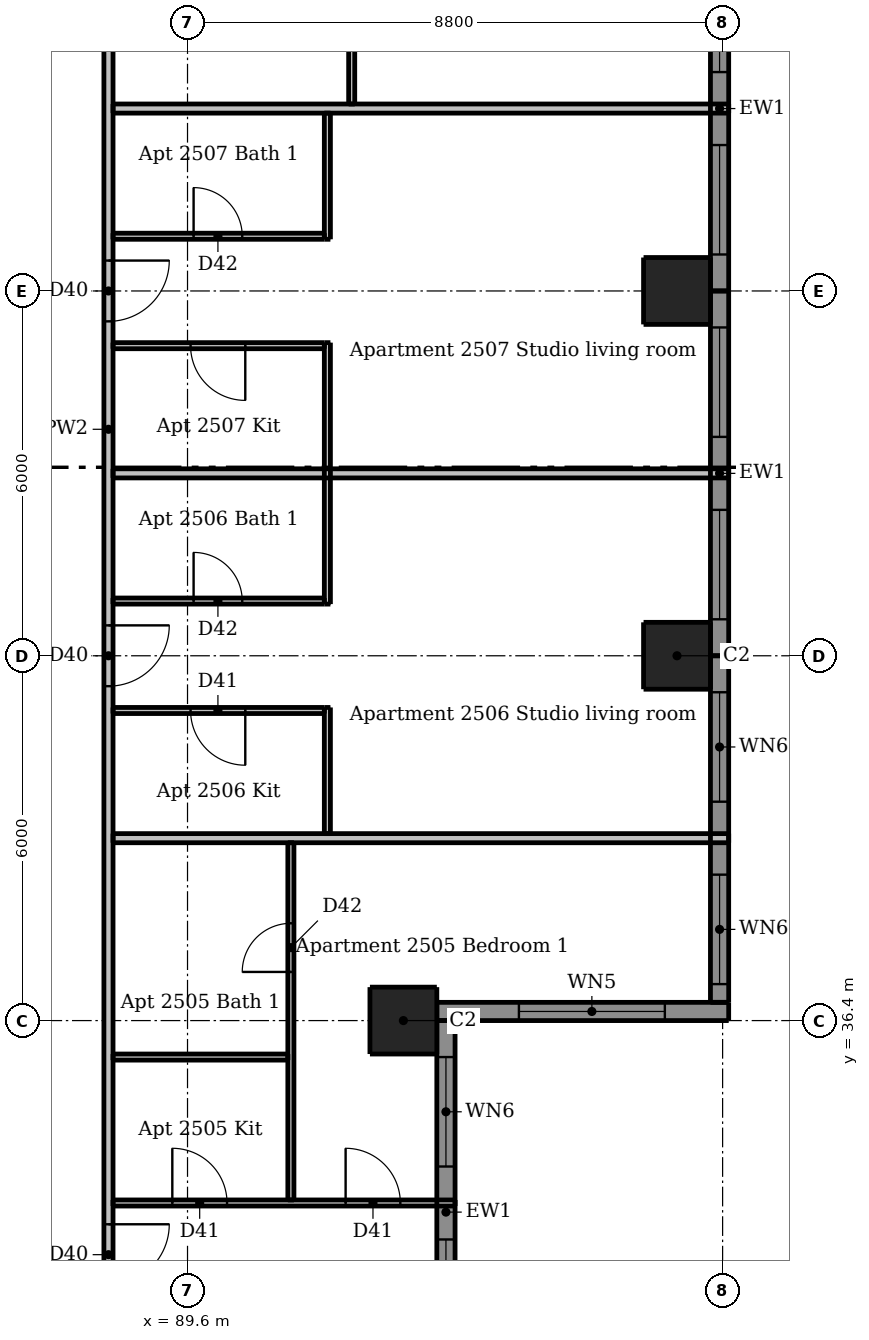
"""IFC4 building model, lengths in metres.
Left out: names, types, materials, properties, quantities, classifications, styles, units other than length and angle.
Written with IfcOpenShell. Run it as: python <this file> out.ifc"""

import sys

from ifc_helpers import new_model, si_unit, direction, frame, frame_2d, origin, origin_2d, place, context, subcontext, project, spatial, rectangle, extrude, element, fill, save


model = new_model("IFC4")
c1 = context("Model", 3, precision=1e-05, world=origin(), true_north=direction((0.0, 1.0)))
c2 = subcontext(c1, "Body", "Model", "MODEL_VIEW")
j1 = project(units=[si_unit("LENGTHUNIT", "METRE"), si_unit("PLANEANGLEUNIT", "RADIAN")], contexts=[c1])
p1 = place(None, origin())
s1 = spatial("IfcSite", under=j1, at=p1, CompositionType="ELEMENT")
p2 = place(p1, origin())
s2 = spatial("IfcBuilding", under=s1, at=p2, CompositionType="ELEMENT")
p3 = place(p2, frame((0.0, 0.0, 95.2)))
s3 = spatial("IfcBuildingStorey", under=s2, at=p3, CompositionType="ELEMENT", Elevation=95.2)
for number, where, z_axis, x_axis in (
    (1, (93.15, 36.4, 0.0), (0.0, 0.0, 1.0), (1.0, 0.0, 0.0)),
    (2, (97.65, 42.4, 0.0), (0.0, 0.0, 1.0), (1.0, 0.0, 0.0)),
    (3, (97.65, 48.4, 0.0), (0.0, 0.0, 1.0), (1.0, 0.0, 0.0)),
):
    element("IfcColumn", number, at=place(p3, frame(where, z_axis=z_axis, x_axis=x_axis)), inside=s3, PredefinedType="COLUMN", context=c2, shape_type="SweptSolid", body=[
        extrude(rectangle(XDim=1.1, YDim=1.1, at=origin_2d()), origin(), (0.0, 0.0, 1.0), 3.05),
    ])
p4 = place(p3, frame((93.7, 36.55, 0.0), z_axis=(0.0, 0.0, 1.0), x_axis=(1.0, 0.0, 0.0)))
e4 = element("IfcWall", 4, at=p4, inside=s3, PredefinedType="SOLIDWALL", context=c2, shape_type="SweptSolid", body=[
    extrude(rectangle(XDim=4.8, YDim=0.3, at=frame_2d((2.4, 0.0))), origin(), (0.0, 0.0, 1.0), 3.05),
])
p5 = place(p4, frame((1.35, 0.0, 0.15)))
e5 = element("IfcOpeningElement", 5, at=p5, cuts=e4, PredefinedType="OPENING", context=c2, shape_type="SweptSolid", body=[
    extrude(rectangle(XDim=2.4, YDim=2.1, at=frame_2d((1.2, 1.05))), frame((0.0, 0.16, 0.0), z_axis=(0.0, -1.0, 0.0), x_axis=(1.0, 0.0, 0.0)), (0.0, 0.0, 1.0), 0.32),
])
p6 = place(p3, frame((93.85, 30.1, 0.0), z_axis=(0.0, 0.0, 1.0), x_axis=(0.0, 1.0, 0.0)))
e6 = element("IfcWall", 6, at=p6, inside=s3, PredefinedType="SOLIDWALL", context=c2, shape_type="SweptSolid", body=[
    extrude(rectangle(XDim=6.3, YDim=0.3, at=frame_2d((3.15, 0.0))), origin(), (0.0, 0.0, 1.0), 3.05),
])
p7 = place(p6, frame((0.9, 0.0, 0.15)))
e7 = element("IfcOpeningElement", 7, at=p7, cuts=e6, PredefinedType="OPENING", context=c2, shape_type="SweptSolid", body=[
    extrude(rectangle(XDim=1.8, YDim=2.1, at=frame_2d((0.9, 1.05))), frame((0.0, 0.16, 0.0), z_axis=(0.0, -1.0, 0.0), x_axis=(1.0, 0.0, 0.0)), (0.0, 0.0, 1.0), 0.32),
])
p8 = place(p6, frame((3.9, 0.0, 0.15)))
e8 = element("IfcOpeningElement", 8, at=p8, cuts=e6, PredefinedType="OPENING", context=c2, shape_type="SweptSolid", body=[
    extrude(rectangle(XDim=1.8, YDim=2.1, at=frame_2d((0.9, 1.05))), frame((0.0, 0.16, 0.0), z_axis=(0.0, -1.0, 0.0), x_axis=(1.0, 0.0, 0.0)), (0.0, 0.0, 1.0), 0.32),
])
p9 = place(p3, frame((98.35, 36.7, 0.0), z_axis=(0.0, 0.0, 1.0), x_axis=(0.0, 1.0, 0.0)))
e9 = element("IfcWall", 9, at=p9, inside=s3, PredefinedType="SOLIDWALL", context=c2, shape_type="SweptSolid", body=[
    extrude(rectangle(XDim=5.7, YDim=0.3, at=frame_2d((2.85, 0.0))), origin(), (0.0, 0.0, 1.0), 3.05),
])
p10 = place(p9, frame((0.3, 0.0, 0.15)))
e10 = element("IfcOpeningElement", 10, at=p10, cuts=e9, PredefinedType="OPENING", context=c2, shape_type="SweptSolid", body=[
    extrude(rectangle(XDim=1.8, YDim=2.1, at=frame_2d((0.9, 1.05))), frame((0.0, 0.16, 0.0), z_axis=(0.0, -1.0, 0.0), x_axis=(1.0, 0.0, 0.0)), (0.0, 0.0, 1.0), 0.32),
])
p11 = place(p9, frame((3.3, 0.0, 0.15)))
e11 = element("IfcOpeningElement", 11, at=p11, cuts=e9, PredefinedType="OPENING", context=c2, shape_type="SweptSolid", body=[
    extrude(rectangle(XDim=1.8, YDim=2.1, at=frame_2d((0.9, 1.05))), frame((0.0, 0.16, 0.0), z_axis=(0.0, -1.0, 0.0), x_axis=(1.0, 0.0, 0.0)), (0.0, 0.0, 1.0), 0.32),
])
p12 = place(p3, frame((98.35, 42.4, 0.0), z_axis=(0.0, 0.0, 1.0), x_axis=(0.0, 1.0, 0.0)))
e12 = element("IfcWall", 12, at=p12, inside=s3, PredefinedType="SOLIDWALL", context=c2, shape_type="SweptSolid", body=[
    extrude(rectangle(XDim=6.0, YDim=0.3, at=frame_2d((3.0, 0.0))), origin(), (0.0, 0.0, 1.0), 3.05),
])
p13 = place(p12, frame((0.6, 0.0, 0.15)))
e13 = element("IfcOpeningElement", 13, at=p13, cuts=e12, PredefinedType="OPENING", context=c2, shape_type="SweptSolid", body=[
    extrude(rectangle(XDim=1.8, YDim=2.1, at=frame_2d((0.9, 1.05))), frame((0.0, 0.16, 0.0), z_axis=(0.0, -1.0, 0.0), x_axis=(1.0, 0.0, 0.0)), (0.0, 0.0, 1.0), 0.32),
])
p14 = place(p12, frame((3.6, 0.0, 0.15)))
e14 = element("IfcOpeningElement", 14, at=p14, cuts=e12, PredefinedType="OPENING", context=c2, shape_type="SweptSolid", body=[
    extrude(rectangle(XDim=1.8, YDim=2.1, at=frame_2d((0.9, 1.05))), frame((0.0, 0.16, 0.0), z_axis=(0.0, -1.0, 0.0), x_axis=(1.0, 0.0, 0.0)), (0.0, 0.0, 1.0), 0.32),
])
p15 = place(p3, frame((98.35, 48.4, 0.0), z_axis=(0.0, 0.0, 1.0), x_axis=(0.0, 1.0, 0.0)))
e15 = element("IfcWall", 15, at=p15, inside=s3, PredefinedType="SOLIDWALL", context=c2, shape_type="SweptSolid", body=[
    extrude(rectangle(XDim=6.0, YDim=0.3, at=frame_2d((3.0, 0.0))), origin(), (0.0, 0.0, 1.0), 3.05),
])
p16 = place(p15, frame((0.6, 0.0, 0.15)))
e16 = element("IfcOpeningElement", 16, at=p16, cuts=e15, PredefinedType="OPENING", context=c2, shape_type="SweptSolid", body=[
    extrude(rectangle(XDim=1.8, YDim=2.1, at=frame_2d((0.9, 1.05))), frame((0.0, 0.16, 0.0), z_axis=(0.0, -1.0, 0.0), x_axis=(1.0, 0.0, 0.0)), (0.0, 0.0, 1.0), 0.32),
])
p17 = place(p15, frame((3.6, 0.0, 0.15)))
e17 = element("IfcOpeningElement", 17, at=p17, cuts=e15, PredefinedType="OPENING", context=c2, shape_type="SweptSolid", body=[
    extrude(rectangle(XDim=1.8, YDim=2.1, at=frame_2d((0.9, 1.05))), frame((0.0, 0.16, 0.0), z_axis=(0.0, -1.0, 0.0), x_axis=(1.0, 0.0, 0.0)), (0.0, 0.0, 1.0), 0.32),
])
p18 = place(p3, frame((91.3, 33.45, 0.0), z_axis=(0.0, 0.0, 1.0), x_axis=(0.0, 1.0, 0.0)))
e18 = element("IfcWall", 18, at=p18, inside=s3, PredefinedType="PARTITIONING", context=c2, shape_type="SweptSolid", body=[
    extrude(rectangle(XDim=5.875, YDim=0.1, at=frame_2d((2.938, 0.0))), origin(), (0.0, 0.0, 1.0), 3.05),
])
p19 = place(p18, frame((3.75, 0.0, 0.0)))
e19 = element("IfcOpeningElement", 19, at=p19, cuts=e18, PredefinedType="OPENING", context=c2, shape_type="SweptSolid", body=[
    extrude(rectangle(XDim=0.8, YDim=2.1, at=frame_2d((0.4, 1.05))), frame((0.0, 0.06, 0.0), z_axis=(0.0, -1.0, 0.0), x_axis=(1.0, 0.0, 0.0)), (0.0, 0.0, 1.0), 0.12),
])
p20 = place(p3, frame((91.9, 39.475, 0.0), z_axis=(0.0, 0.0, 1.0), x_axis=(0.0, 1.0, 0.0)))
e20 = element("IfcWall", 20, at=p20, inside=s3, PredefinedType="PARTITIONING", context=c2, shape_type="SweptSolid", body=[
    extrude(rectangle(XDim=2.075, YDim=0.1, at=frame_2d((1.038, 0.0))), origin(), (0.0, 0.0, 1.0), 3.05),
])
p21 = place(p3, frame((91.9, 43.25, 0.0), z_axis=(0.0, 0.0, 1.0), x_axis=(0.0, 1.0, 0.0)))
e21 = element("IfcWall", 21, at=p21, inside=s3, PredefinedType="PARTITIONING", context=c2, shape_type="SweptSolid", body=[
    extrude(rectangle(XDim=4.3, YDim=0.1, at=frame_2d((2.15, 0.0))), origin(), (0.0, 0.0, 1.0), 3.05),
])
p22 = place(p3, frame((91.9, 49.25, 0.0), z_axis=(0.0, 0.0, 1.0), x_axis=(0.0, 1.0, 0.0)))
e22 = element("IfcWall", 22, at=p22, inside=s3, PredefinedType="PARTITIONING", context=c2, shape_type="SweptSolid", body=[
    extrude(rectangle(XDim=2.075, YDim=0.1, at=frame_2d((1.038, 0.0))), origin(), (0.0, 0.0, 1.0), 3.05),
])
p23 = place(p3, frame((92.3, 51.475, 0.0), z_axis=(0.0, 0.0, 1.0), x_axis=(0.0, 1.0, 0.0)))
e23 = element("IfcWall", 23, at=p23, inside=s3, PredefinedType="PARTITIONING", context=c2, shape_type="SweptSolid", body=[
    extrude(rectangle(XDim=2.875, YDim=0.1, at=frame_2d((1.438, 0.0))), origin(), (0.0, 0.0, 1.0), 3.05),
])
p24 = place(p3, frame((88.375, 49.3, 0.0), z_axis=(0.0, 0.0, 1.0), x_axis=(1.0, 0.0, 0.0)))
e24 = element("IfcWall", 24, at=p24, inside=s3, PredefinedType="PARTITIONING", context=c2, shape_type="SweptSolid", body=[
    extrude(rectangle(XDim=3.475, YDim=0.1, at=frame_2d((1.738, 0.0))), origin(), (0.0, 0.0, 1.0), 3.05),
])
p25 = place(p24, frame((1.325, 0.0, 0.0)))
e25 = element("IfcOpeningElement", 25, at=p25, cuts=e24, PredefinedType="OPENING", context=c2, shape_type="SweptSolid", body=[
    extrude(rectangle(XDim=0.8, YDim=2.1, at=frame_2d((0.4, 1.05))), frame((0.0, 0.06, 0.0), z_axis=(0.0, -1.0, 0.0), x_axis=(1.0, 0.0, 0.0)), (0.0, 0.0, 1.0), 0.12),
])
p26 = place(p3, frame((91.85, 47.5, 0.0), z_axis=(0.0, 0.0, 1.0), x_axis=(-1.0, 0.0, 0.0)))
e26 = element("IfcWall", 26, at=p26, inside=s3, PredefinedType="PARTITIONING", context=c2, shape_type="SweptSolid", body=[
    extrude(rectangle(XDim=3.475, YDim=0.1, at=frame_2d((1.738, 0.0))), origin(), (0.0, 0.0, 1.0), 3.05),
])
p27 = place(p26, frame((1.3, 0.0, 0.0)))
e27 = element("IfcOpeningElement", 27, at=p27, cuts=e26, PredefinedType="OPENING", context=c2, shape_type="SweptSolid", body=[
    extrude(rectangle(XDim=0.9, YDim=2.1, at=frame_2d((0.45, 1.05))), frame((0.0, 0.06, 0.0), z_axis=(0.0, -1.0, 0.0), x_axis=(1.0, 0.0, 0.0)), (0.0, 0.0, 1.0), 0.12),
])
p28 = place(p3, frame((88.375, 43.3, 0.0), z_axis=(0.0, 0.0, 1.0), x_axis=(1.0, 0.0, 0.0)))
e28 = element("IfcWall", 28, at=p28, inside=s3, PredefinedType="PARTITIONING", context=c2, shape_type="SweptSolid", body=[
    extrude(rectangle(XDim=3.475, YDim=0.1, at=frame_2d((1.738, 0.0))), origin(), (0.0, 0.0, 1.0), 3.05),
])
p29 = place(p28, frame((1.325, 0.0, 0.0)))
e29 = element("IfcOpeningElement", 29, at=p29, cuts=e28, PredefinedType="OPENING", context=c2, shape_type="SweptSolid", body=[
    extrude(rectangle(XDim=0.8, YDim=2.1, at=frame_2d((0.4, 1.05))), frame((0.0, 0.06, 0.0), z_axis=(0.0, -1.0, 0.0), x_axis=(1.0, 0.0, 0.0)), (0.0, 0.0, 1.0), 0.12),
])
p30 = place(p3, frame((91.85, 41.5, 0.0), z_axis=(0.0, 0.0, 1.0), x_axis=(-1.0, 0.0, 0.0)))
e30 = element("IfcWall", 30, at=p30, inside=s3, PredefinedType="PARTITIONING", context=c2, shape_type="SweptSolid", body=[
    extrude(rectangle(XDim=3.475, YDim=0.1, at=frame_2d((1.738, 0.0))), origin(), (0.0, 0.0, 1.0), 3.05),
])
p31 = place(p30, frame((1.3, 0.0, 0.0)))
e31 = element("IfcOpeningElement", 31, at=p31, cuts=e30, PredefinedType="OPENING", context=c2, shape_type="SweptSolid", body=[
    extrude(rectangle(XDim=0.9, YDim=2.1, at=frame_2d((0.45, 1.05))), frame((0.0, 0.06, 0.0), z_axis=(0.0, -1.0, 0.0), x_axis=(1.0, 0.0, 0.0)), (0.0, 0.0, 1.0), 0.12),
])
p32 = place(p3, frame((88.375, 35.8, 0.0), z_axis=(0.0, 0.0, 1.0), x_axis=(1.0, 0.0, 0.0)))
e32 = element("IfcWall", 32, at=p32, inside=s3, PredefinedType="PARTITIONING", context=c2, shape_type="SweptSolid", body=[
    extrude(rectangle(XDim=2.875, YDim=0.1, at=frame_2d((1.438, 0.0))), origin(), (0.0, 0.0, 1.0), 3.05),
])
p33 = place(p3, frame((88.375, 33.4, 0.0), z_axis=(0.0, 0.0, 1.0), x_axis=(1.0, 0.0, 0.0)))
e33 = element("IfcWall", 33, at=p33, inside=s3, PredefinedType="PARTITIONING", context=c2, shape_type="SweptSolid", body=[
    extrude(rectangle(XDim=5.625, YDim=0.1, at=frame_2d((2.812, 0.0))), origin(), (0.0, 0.0, 1.0), 3.05),
])
p34 = place(p33, frame((0.975, 0.0, 0.0)))
e34 = element("IfcOpeningElement", 34, at=p34, cuts=e33, PredefinedType="OPENING", context=c2, shape_type="SweptSolid", body=[
    extrude(rectangle(XDim=0.9, YDim=2.1, at=frame_2d((0.45, 1.05))), frame((0.0, 0.06, 0.0), z_axis=(0.0, -1.0, 0.0), x_axis=(1.0, 0.0, 0.0)), (0.0, 0.0, 1.0), 0.12),
])
p35 = place(p33, frame((3.825, 0.0, 0.0)))
e35 = element("IfcOpeningElement", 35, at=p35, cuts=e33, PredefinedType="OPENING", context=c2, shape_type="SweptSolid", body=[
    extrude(rectangle(XDim=0.9, YDim=2.1, at=frame_2d((0.45, 1.05))), frame((0.0, 0.06, 0.0), z_axis=(0.0, -1.0, 0.0), x_axis=(1.0, 0.0, 0.0)), (0.0, 0.0, 1.0), 0.12),
])
p36 = place(p3, frame((88.3, 60.475, 0.0), z_axis=(0.0, 0.0, 1.0), x_axis=(0.0, -1.0, 0.0)))
e36 = element("IfcWall", 36, at=p36, inside=s3, PredefinedType="PARTITIONING", context=c2, shape_type="SweptSolid", body=[
    extrude(rectangle(XDim=28.7, YDim=0.15, at=frame_2d((14.35, 0.0))), origin(), (0.0, 0.0, 1.0), 3.05),
])
p37 = place(p36, frame((27.425, 0.0, 0.0)))
e37 = element("IfcOpeningElement", 37, at=p37, cuts=e36, PredefinedType="OPENING", context=c2, shape_type="SweptSolid", body=[
    extrude(rectangle(XDim=1.0, YDim=2.1, at=frame_2d((0.5, 1.05))), frame((0.0, 0.085, 0.0), z_axis=(0.0, -1.0, 0.0), x_axis=(1.0, 0.0, 0.0)), (0.0, 0.0, 1.0), 0.17),
])
p38 = place(p36, frame((17.575, 0.0, 0.0)))
e38 = element("IfcOpeningElement", 38, at=p38, cuts=e36, PredefinedType="OPENING", context=c2, shape_type="SweptSolid", body=[
    extrude(rectangle(XDim=1.0, YDim=2.1, at=frame_2d((0.5, 1.05))), frame((0.0, 0.085, 0.0), z_axis=(0.0, -1.0, 0.0), x_axis=(1.0, 0.0, 0.0)), (0.0, 0.0, 1.0), 0.17),
])
p39 = place(p36, frame((11.575, 0.0, 0.0)))
e39 = element("IfcOpeningElement", 39, at=p39, cuts=e36, PredefinedType="OPENING", context=c2, shape_type="SweptSolid", body=[
    extrude(rectangle(XDim=1.0, YDim=2.1, at=frame_2d((0.5, 1.05))), frame((0.0, 0.085, 0.0), z_axis=(0.0, -1.0, 0.0), x_axis=(1.0, 0.0, 0.0)), (0.0, 0.0, 1.0), 0.17),
])
p40 = place(p36, frame((3.775, 0.0, 0.0)))
e40 = element("IfcOpeningElement", 40, at=p40, cuts=e36, PredefinedType="OPENING", context=c2, shape_type="SweptSolid", body=[
    extrude(rectangle(XDim=1.0, YDim=2.1, at=frame_2d((0.5, 1.05))), frame((0.0, 0.085, 0.0), z_axis=(0.0, -1.0, 0.0), x_axis=(1.0, 0.0, 0.0)), (0.0, 0.0, 1.0), 0.17),
])
for number, where, z_axis, x_axis in (
    (41, (88.375, 51.4, 0.0), (0.0, 0.0, 1.0), (1.0, 0.0, 0.0)),
    (42, (88.375, 45.4, 0.0), (0.0, 0.0, 1.0), (1.0, 0.0, 0.0)),
    (43, (88.375, 39.4, 0.0), (0.0, 0.0, 1.0), (1.0, 0.0, 0.0)),
):
    element("IfcWall", number, at=place(p3, frame(where, z_axis=z_axis, x_axis=x_axis)), inside=s3, PredefinedType="PARTITIONING", context=c2, shape_type="SweptSolid", body=[
        extrude(rectangle(XDim=10.125, YDim=0.15, at=frame_2d((5.062, 0.0))), origin(), (0.0, 0.0, 1.0), 3.05),
    ])
p41 = place(p5, origin())
e44 = element("IfcWindow", 44, at=p41, inside=s3, PartitioningType="DOUBLE_PANEL_VERTICAL", PredefinedType="WINDOW", context=c2, shape_type="SweptSolid", body=[
    extrude(rectangle(XDim=2.4, YDim=2.1, at=frame_2d((1.2, 1.05))), frame((0.0, 0.03, 0.0), z_axis=(0.0, -1.0, 0.0), x_axis=(1.0, 0.0, 0.0)), (0.0, 0.0, 1.0), 0.06),
])
fill(e5, e44)
p42 = place(p7, origin())
e45 = element("IfcWindow", 45, at=p42, inside=s3, PartitioningType="DOUBLE_PANEL_VERTICAL", PredefinedType="WINDOW", context=c2, shape_type="SweptSolid", body=[
    extrude(rectangle(XDim=1.8, YDim=2.1, at=frame_2d((0.9, 1.05))), frame((0.0, 0.03, 0.0), z_axis=(0.0, -1.0, 0.0), x_axis=(1.0, 0.0, 0.0)), (0.0, 0.0, 1.0), 0.06),
])
fill(e7, e45)
p43 = place(p8, origin())
e46 = element("IfcWindow", 46, at=p43, inside=s3, PartitioningType="DOUBLE_PANEL_VERTICAL", PredefinedType="WINDOW", context=c2, shape_type="SweptSolid", body=[
    extrude(rectangle(XDim=1.8, YDim=2.1, at=frame_2d((0.9, 1.05))), frame((0.0, 0.03, 0.0), z_axis=(0.0, -1.0, 0.0), x_axis=(1.0, 0.0, 0.0)), (0.0, 0.0, 1.0), 0.06),
])
fill(e8, e46)
p44 = place(p10, origin())
e47 = element("IfcWindow", 47, at=p44, inside=s3, PartitioningType="DOUBLE_PANEL_VERTICAL", PredefinedType="WINDOW", context=c2, shape_type="SweptSolid", body=[
    extrude(rectangle(XDim=1.8, YDim=2.1, at=frame_2d((0.9, 1.05))), frame((0.0, 0.03, 0.0), z_axis=(0.0, -1.0, 0.0), x_axis=(1.0, 0.0, 0.0)), (0.0, 0.0, 1.0), 0.06),
])
fill(e10, e47)
p45 = place(p11, origin())
e48 = element("IfcWindow", 48, at=p45, inside=s3, PartitioningType="DOUBLE_PANEL_VERTICAL", PredefinedType="WINDOW", context=c2, shape_type="SweptSolid", body=[
    extrude(rectangle(XDim=1.8, YDim=2.1, at=frame_2d((0.9, 1.05))), frame((0.0, 0.03, 0.0), z_axis=(0.0, -1.0, 0.0), x_axis=(1.0, 0.0, 0.0)), (0.0, 0.0, 1.0), 0.06),
])
fill(e11, e48)
p46 = place(p13, origin())
e49 = element("IfcWindow", 49, at=p46, inside=s3, PartitioningType="DOUBLE_PANEL_VERTICAL", PredefinedType="WINDOW", context=c2, shape_type="SweptSolid", body=[
    extrude(rectangle(XDim=1.8, YDim=2.1, at=frame_2d((0.9, 1.05))), frame((0.0, 0.03, 0.0), z_axis=(0.0, -1.0, 0.0), x_axis=(1.0, 0.0, 0.0)), (0.0, 0.0, 1.0), 0.06),
])
fill(e13, e49)
p47 = place(p14, origin())
e50 = element("IfcWindow", 50, at=p47, inside=s3, PartitioningType="DOUBLE_PANEL_VERTICAL", PredefinedType="WINDOW", context=c2, shape_type="SweptSolid", body=[
    extrude(rectangle(XDim=1.8, YDim=2.1, at=frame_2d((0.9, 1.05))), frame((0.0, 0.03, 0.0), z_axis=(0.0, -1.0, 0.0), x_axis=(1.0, 0.0, 0.0)), (0.0, 0.0, 1.0), 0.06),
])
fill(e14, e50)
p48 = place(p16, origin())
e51 = element("IfcWindow", 51, at=p48, inside=s3, PartitioningType="DOUBLE_PANEL_VERTICAL", PredefinedType="WINDOW", context=c2, shape_type="SweptSolid", body=[
    extrude(rectangle(XDim=1.8, YDim=2.1, at=frame_2d((0.9, 1.05))), frame((0.0, 0.03, 0.0), z_axis=(0.0, -1.0, 0.0), x_axis=(1.0, 0.0, 0.0)), (0.0, 0.0, 1.0), 0.06),
])
fill(e16, e51)
p49 = place(p17, origin())
e52 = element("IfcWindow", 52, at=p49, inside=s3, PartitioningType="DOUBLE_PANEL_VERTICAL", PredefinedType="WINDOW", context=c2, shape_type="SweptSolid", body=[
    extrude(rectangle(XDim=1.8, YDim=2.1, at=frame_2d((0.9, 1.05))), frame((0.0, 0.03, 0.0), z_axis=(0.0, -1.0, 0.0), x_axis=(1.0, 0.0, 0.0)), (0.0, 0.0, 1.0), 0.06),
])
fill(e17, e52)
p50 = place(p37, origin())
e53 = element("IfcDoor", 53, at=p50, inside=s3, OperationType="SINGLE_SWING_LEFT", PredefinedType="DOOR", context=c2, shape_type="SweptSolid", body=[
    extrude(rectangle(XDim=1.0, YDim=2.1, at=frame_2d((0.5, 1.05))), frame((0.0, 0.025, 0.0), z_axis=(0.0, -1.0, 0.0), x_axis=(1.0, 0.0, 0.0)), (0.0, 0.0, 1.0), 0.05),
])
fill(e37, e53)
p51 = place(p34, origin())
e54 = element("IfcDoor", 54, at=p51, inside=s3, OperationType="SINGLE_SWING_LEFT", PredefinedType="DOOR", context=c2, shape_type="SweptSolid", body=[
    extrude(rectangle(XDim=0.9, YDim=2.1, at=frame_2d((0.45, 1.05))), frame((0.0, 0.025, 0.0), z_axis=(0.0, -1.0, 0.0), x_axis=(1.0, 0.0, 0.0)), (0.0, 0.0, 1.0), 0.05),
])
fill(e34, e54)
p52 = place(p35, origin())
e55 = element("IfcDoor", 55, at=p52, inside=s3, OperationType="SINGLE_SWING_LEFT", PredefinedType="DOOR", context=c2, shape_type="SweptSolid", body=[
    extrude(rectangle(XDim=0.9, YDim=2.1, at=frame_2d((0.45, 1.05))), frame((0.0, 0.025, 0.0), z_axis=(0.0, -1.0, 0.0), x_axis=(1.0, 0.0, 0.0)), (0.0, 0.0, 1.0), 0.05),
])
fill(e35, e55)
p53 = place(p19, origin())
e56 = element("IfcDoor", 56, at=p53, inside=s3, OperationType="SINGLE_SWING_LEFT", PredefinedType="DOOR", context=c2, shape_type="SweptSolid", body=[
    extrude(rectangle(XDim=0.8, YDim=2.1, at=frame_2d((0.4, 1.05))), frame((0.0, 0.025, 0.0), z_axis=(0.0, -1.0, 0.0), x_axis=(1.0, 0.0, 0.0)), (0.0, 0.0, 1.0), 0.05),
])
fill(e19, e56)
p54 = place(p38, origin())
e57 = element("IfcDoor", 57, at=p54, inside=s3, OperationType="SINGLE_SWING_LEFT", PredefinedType="DOOR", context=c2, shape_type="SweptSolid", body=[
    extrude(rectangle(XDim=1.0, YDim=2.1, at=frame_2d((0.5, 1.05))), frame((0.0, 0.025, 0.0), z_axis=(0.0, -1.0, 0.0), x_axis=(1.0, 0.0, 0.0)), (0.0, 0.0, 1.0), 0.05),
])
fill(e38, e57)
p55 = place(p31, origin())
e58 = element("IfcDoor", 58, at=p55, inside=s3, OperationType="SINGLE_SWING_LEFT", PredefinedType="DOOR", context=c2, shape_type="SweptSolid", body=[
    extrude(rectangle(XDim=0.9, YDim=2.1, at=frame_2d((0.45, 1.05))), frame((0.0, 0.025, 0.0), z_axis=(0.0, -1.0, 0.0), x_axis=(1.0, 0.0, 0.0)), (0.0, 0.0, 1.0), 0.05),
])
fill(e31, e58)
p56 = place(p29, origin())
e59 = element("IfcDoor", 59, at=p56, inside=s3, OperationType="SINGLE_SWING_LEFT", PredefinedType="DOOR", context=c2, shape_type="SweptSolid", body=[
    extrude(rectangle(XDim=0.8, YDim=2.1, at=frame_2d((0.4, 1.05))), frame((0.0, 0.025, 0.0), z_axis=(0.0, -1.0, 0.0), x_axis=(1.0, 0.0, 0.0)), (0.0, 0.0, 1.0), 0.05),
])
fill(e29, e59)
p57 = place(p39, origin())
e60 = element("IfcDoor", 60, at=p57, inside=s3, OperationType="SINGLE_SWING_LEFT", PredefinedType="DOOR", context=c2, shape_type="SweptSolid", body=[
    extrude(rectangle(XDim=1.0, YDim=2.1, at=frame_2d((0.5, 1.05))), frame((0.0, 0.025, 0.0), z_axis=(0.0, -1.0, 0.0), x_axis=(1.0, 0.0, 0.0)), (0.0, 0.0, 1.0), 0.05),
])
fill(e39, e60)
p58 = place(p27, origin())
e61 = element("IfcDoor", 61, at=p58, inside=s3, OperationType="SINGLE_SWING_LEFT", PredefinedType="DOOR", context=c2, shape_type="SweptSolid", body=[
    extrude(rectangle(XDim=0.9, YDim=2.1, at=frame_2d((0.45, 1.05))), frame((0.0, 0.025, 0.0), z_axis=(0.0, -1.0, 0.0), x_axis=(1.0, 0.0, 0.0)), (0.0, 0.0, 1.0), 0.05),
])
fill(e27, e61)
p59 = place(p25, origin())
e62 = element("IfcDoor", 62, at=p59, inside=s3, OperationType="SINGLE_SWING_LEFT", PredefinedType="DOOR", context=c2, shape_type="SweptSolid", body=[
    extrude(rectangle(XDim=0.8, YDim=2.1, at=frame_2d((0.4, 1.05))), frame((0.0, 0.025, 0.0), z_axis=(0.0, -1.0, 0.0), x_axis=(1.0, 0.0, 0.0)), (0.0, 0.0, 1.0), 0.05),
])
fill(e25, e62)
save(model, sys.argv[1])
